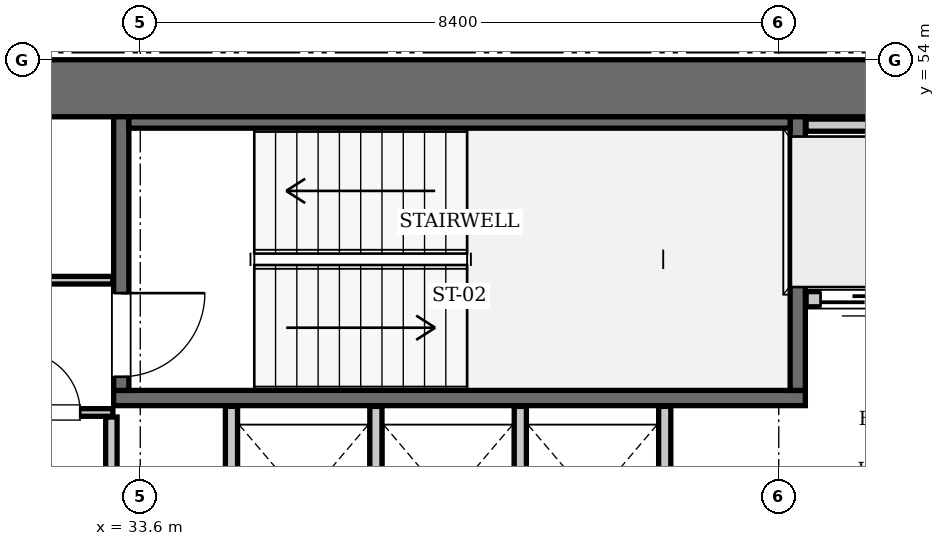
"""IFC4 building model, lengths in metres.
Left out: names, types, materials, properties, quantities, classifications, styles, units other than length and angle.
Written with IfcOpenShell. Run it as: python <this file> out.ifc"""

import sys

from ifc_helpers import new_model, si_unit, direction, frame, frame_2d, origin, place, context, subcontext, project, spatial, rectangle, extrude, element, fill, save


model = new_model("IFC4")
c1 = context("Model", 3, precision=1e-05, world=origin(), true_north=direction((0.0, 1.0)))
c2 = subcontext(c1, "Body", "Model", "MODEL_VIEW")
j1 = project(units=[si_unit("LENGTHUNIT", "METRE"), si_unit("PLANEANGLEUNIT", "RADIAN")], contexts=[c1])
p1 = place(None, origin())
s1 = spatial("IfcSite", under=j1, at=p1, CompositionType="ELEMENT")
p2 = place(p1, origin())
s2 = spatial("IfcBuilding", under=s1, at=p2, CompositionType="ELEMENT")
p3 = place(p2, frame((0.0, 0.0, 215.95)))
s3 = spatial("IfcBuildingStorey", under=s2, at=p3, CompositionType="ELEMENT", Elevation=215.95)
p4 = place(p3, frame((25.2, 53.625, 0.0), z_axis=(0.0, 0.0, 1.0), x_axis=(1.0, 0.0, 0.0)))
e1 = element("IfcWall", 1, at=p4, inside=s3, PredefinedType="SHEAR", context=c2, shape_type="SweptSolid", body=[
    extrude(rectangle(XDim=25.2, YDim=0.75, at=frame_2d((12.6, 0.0))), origin(), (0.0, 0.0, 1.0), 3.85),
])
p5 = place(p3, frame((33.25, 49.55, 0.0), z_axis=(0.0, 0.0, 1.0), x_axis=(1.0, 0.0, 0.0)))
e2 = element("IfcWall", 2, at=p5, inside=s3, PredefinedType="SOLIDWALL", context=c2, shape_type="SweptSolid", body=[
    extrude(rectangle(XDim=9.1, YDim=0.2, at=frame_2d((4.55, 0.0))), origin(), (0.0, 0.0, 1.0), 3.61),
])
p6 = place(p3, frame((42.25, 49.65, 0.0), z_axis=(0.0, 0.0, 1.0), x_axis=(0.0, 1.0, 0.0)))
e3 = element("IfcWall", 3, at=p6, inside=s3, PredefinedType="SOLIDWALL", context=c2, shape_type="SweptSolid", body=[
    extrude(rectangle(XDim=3.6, YDim=0.2, at=frame_2d((1.8, 0.0))), origin(), (0.0, 0.0, 1.0), 3.61),
])
p7 = place(p3, frame((33.35, 49.65, 0.0), z_axis=(0.0, 0.0, 1.0), x_axis=(0.0, 1.0, 0.0)))
e4 = element("IfcWall", 4, at=p7, inside=s3, PredefinedType="SOLIDWALL", context=c2, shape_type="SweptSolid", body=[
    extrude(rectangle(XDim=3.6, YDim=0.2, at=frame_2d((1.8, 0.0))), origin(), (0.0, 0.0, 1.0), 3.61),
])
p8 = place(p7, frame((0.18, 0.0, 0.0)))
e5 = element("IfcOpeningElement", 5, at=p8, cuts=e4, PredefinedType="OPENING", context=c2, shape_type="SweptSolid", body=[
    extrude(rectangle(XDim=1.1, YDim=2.15, at=frame_2d((0.55, 1.075))), frame((0.0, 0.11, 0.0), z_axis=(0.0, -1.0, 0.0), x_axis=(1.0, 0.0, 0.0)), (0.0, 0.0, 1.0), 0.22),
])
p9 = place(p3, frame((33.45, 53.175, 0.0), z_axis=(0.0, 0.0, 1.0), x_axis=(1.0, 0.0, 0.0)))
e6 = element("IfcWall", 6, at=p9, inside=s3, PredefinedType="SOLIDWALL", context=c2, shape_type="SweptSolid", body=[
    extrude(rectangle(XDim=8.7, YDim=0.15, at=frame_2d((4.35, 0.0))), origin(), (0.0, 0.0, 1.0), 3.61),
])
p10 = place(p3, frame((42.36, 50.85, 0.0), z_axis=(0.0, 0.0, 1.0), x_axis=(1.0, 0.0, 0.0)))
e7 = element("IfcWall", 7, at=p10, inside=s3, PredefinedType="SOLIDWALL", context=c2, shape_type="SweptSolid", body=[
    extrude(rectangle(XDim=1.38, YDim=0.2, at=frame_2d((0.69, 0.0))), origin(), (0.0, 0.0, 1.0), 3.61),
])
p11 = place(p10, frame((0.19, 0.0, 0.0)))
e8 = element("IfcOpeningElement", 8, at=p11, cuts=e7, PredefinedType="OPENING", context=c2, shape_type="SweptSolid", body=[
    extrude(rectangle(XDim=1.0, YDim=2.15, at=frame_2d((0.5, 1.075))), frame((0.0, 0.11, 0.0), z_axis=(0.0, -1.0, 0.0), x_axis=(1.0, 0.0, 0.0)), (0.0, 0.0, 1.0), 0.22),
])
p12 = place(p3, frame((42.36, 53.14, 0.0), z_axis=(0.0, 0.0, 1.0), x_axis=(1.0, 0.0, 0.0)))
e9 = element("IfcWall", 9, at=p12, inside=s3, PredefinedType="SOLIDWALL", context=c2, shape_type="SweptSolid", body=[
    extrude(rectangle(XDim=3.14, YDim=0.16, at=frame_2d((1.57, 0.0))), origin(), (0.0, 0.0, 1.0), 3.61),
])
for number, where, z_axis, x_axis in (
    (10, (34.8, 47.25, 0.0), (0.0, 0.0, 1.0), (0.0, 1.0, 0.0)),
    (11, (36.7, 47.25, 0.0), (0.0, 0.0, 1.0), (0.0, 1.0, 0.0)),
    (12, (38.6, 47.25, 0.0), (0.0, 0.0, 1.0), (0.0, 1.0, 0.0)),
    (13, (40.5, 47.25, 0.0), (0.0, 0.0, 1.0), (0.0, 1.0, 0.0)),
):
    element("IfcWall", number, at=place(p3, frame(where, z_axis=z_axis, x_axis=x_axis)), inside=s3, PredefinedType="SOLIDWALL", context=c2, shape_type="SweptSolid", body=[
        extrude(rectangle(XDim=2.19, YDim=0.16, at=frame_2d((1.095, 0.0))), origin(), (0.0, 0.0, 1.0), 3.61),
    ])
p13 = place(p3, frame((33.22, 45.14, 0.0), z_axis=(0.0, 0.0, 1.0), x_axis=(0.0, 1.0, 0.0)))
e14 = element("IfcWall", 14, at=p13, inside=s3, PredefinedType="PARTITIONING", context=c2, shape_type="SweptSolid", body=[
    extrude(rectangle(XDim=4.16, YDim=0.15, at=frame_2d((2.08, 0.0))), origin(), (0.0, 0.0, 1.0), 3.61),
])
p14 = place(p3, frame((30.06, 49.36, 0.0), z_axis=(0.0, 0.0, 1.0), x_axis=(1.0, 0.0, 0.0)))
e15 = element("IfcWall", 15, at=p14, inside=s3, PredefinedType="PARTITIONING", context=c2, shape_type="SweptSolid", body=[
    extrude(rectangle(XDim=3.18, YDim=0.1, at=frame_2d((1.59, 0.0))), origin(), (0.0, 0.0, 1.0), 3.61),
])
p15 = place(p14, frame((1.95, 0.0, 0.0)))
e16 = element("IfcOpeningElement", 16, at=p15, cuts=e15, PredefinedType="OPENING", context=c2, shape_type="SweptSolid", body=[
    extrude(rectangle(XDim=0.8, YDim=2.05, at=frame_2d((0.4, 1.025))), frame((0.0, 0.06, 0.0), z_axis=(0.0, -1.0, 0.0), x_axis=(1.0, 0.0, 0.0)), (0.0, 0.0, 1.0), 0.12),
])
p16 = place(p3, frame((31.82, 51.1, 0.0), z_axis=(0.0, 0.0, 1.0), x_axis=(1.0, 0.0, 0.0)))
e17 = element("IfcWall", 17, at=p16, inside=s3, PredefinedType="PARTITIONING", context=c2, shape_type="SweptSolid", body=[
    extrude(rectangle(XDim=1.42, YDim=0.1, at=frame_2d((0.71, 0.0))), origin(), (0.0, 0.0, 1.0), 3.61),
])
p17 = place(p8, frame((1.1, 0.0, 0.0), z_axis=(0.0, 0.0, 1.0), x_axis=(-1.0, 0.0, 0.0)))
e18 = element("IfcDoor", 18, at=p17, inside=s3, OperationType="SINGLE_SWING_LEFT", PredefinedType="DOOR", context=c2, shape_type="SweptSolid", body=[
    extrude(rectangle(XDim=1.1, YDim=2.15, at=frame_2d((0.55, 1.075))), frame((0.0, 0.025, 0.0), z_axis=(0.0, -1.0, 0.0), x_axis=(1.0, 0.0, 0.0)), (0.0, 0.0, 1.0), 0.05),
])
fill(e5, e18)
p18 = place(p11, frame((1.0, 0.0, 0.0), z_axis=(0.0, 0.0, 1.0), x_axis=(-1.0, 0.0, 0.0)))
e19 = element("IfcDoor", 19, at=p18, inside=s3, OperationType="SLIDING_TO_LEFT", PredefinedType="DOOR", context=c2, shape_type="SweptSolid", body=[
    extrude(rectangle(XDim=1.0, YDim=2.15, at=frame_2d((0.5, 1.075))), frame((0.0, 0.025, 0.0), z_axis=(0.0, -1.0, 0.0), x_axis=(1.0, 0.0, 0.0)), (0.0, 0.0, 1.0), 0.05),
])
fill(e8, e19)
p19 = place(p15, origin())
e20 = element("IfcDoor", 20, at=p19, inside=s3, OperationType="SINGLE_SWING_LEFT", PredefinedType="DOOR", context=c2, shape_type="SweptSolid", body=[
    extrude(rectangle(XDim=0.8, YDim=2.05, at=frame_2d((0.4, 1.025))), frame((0.0, 0.025, 0.0), z_axis=(0.0, -1.0, 0.0), x_axis=(1.0, 0.0, 0.0)), (0.0, 0.0, 1.0), 0.05),
])
fill(e16, e20)
save(model, sys.argv[1])
